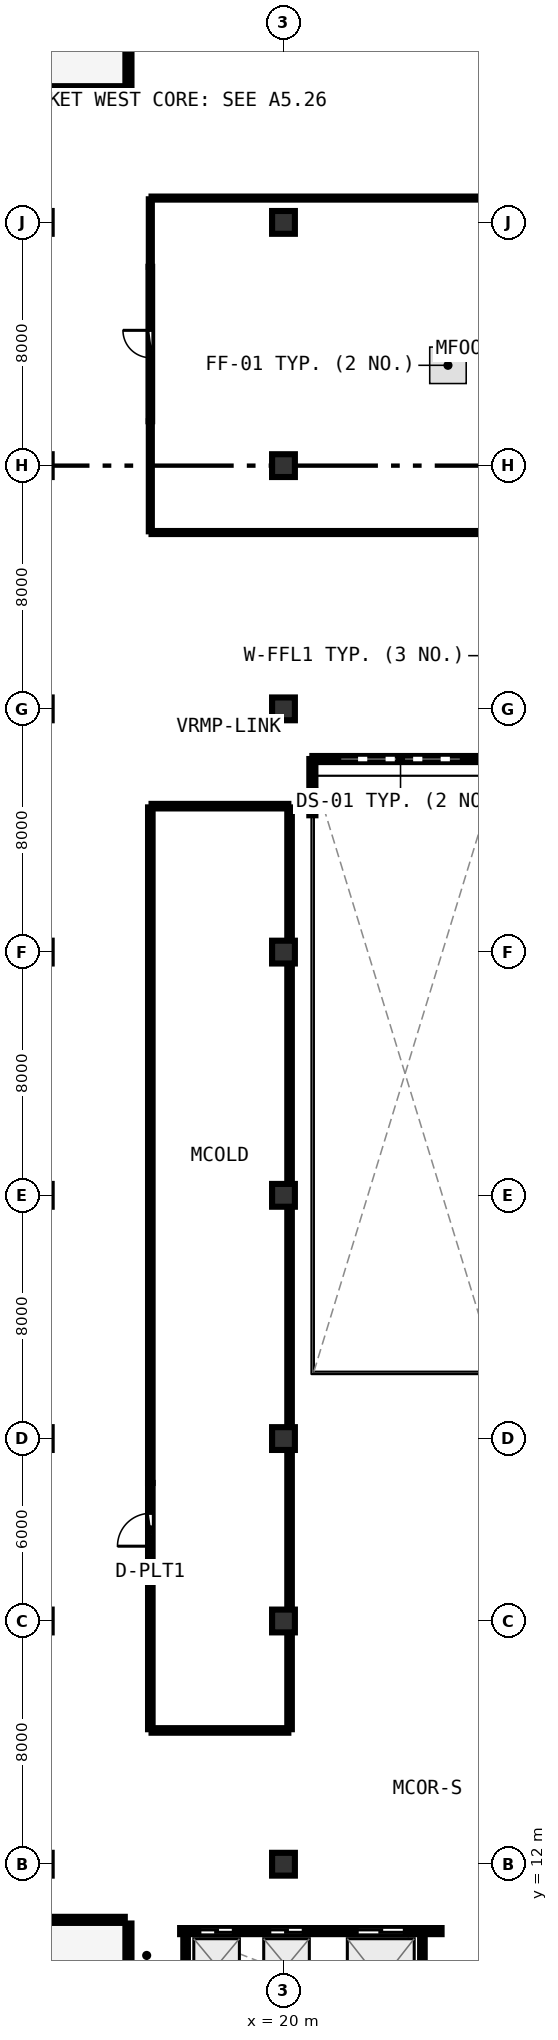
"""IFC4 building model, lengths in metres.
Left out: names, types, materials, properties, quantities, classifications, styles, units other than length and angle.
Written with IfcOpenShell. Run it as: python <this file> out.ifc"""

import sys

from ifc_helpers import new_model, si_unit, direction, frame, frame_2d, origin, origin_2d, place, context, subcontext, project, spatial, rectangle, extrude, element, fill, save


model = new_model("IFC4")
c1 = context("Model", 3, precision=1e-05, world=origin(), true_north=direction((0.0, 1.0)))
c2 = subcontext(c1, "Body", "Model", "MODEL_VIEW")
j1 = project(units=[si_unit("LENGTHUNIT", "METRE"), si_unit("PLANEANGLEUNIT", "RADIAN")], contexts=[c1])
p1 = place(None, origin())
s1 = spatial("IfcSite", under=j1, at=p1, CompositionType="ELEMENT")
p2 = place(p1, origin())
s2 = spatial("IfcBuilding", under=s1, at=p2, CompositionType="ELEMENT")
p3 = place(p2, origin())
s3 = spatial("IfcBuildingStorey", under=s2, at=p3, CompositionType="ELEMENT", Elevation=0.0)
for number, where, z_axis, x_axis in (
    (1, (20.0, 12.0, 0.0), (0.0, 0.0, 1.0), (1.0, 0.0, 0.0)),
    (2, (20.0, 20.0, 0.0), (0.0, 0.0, 1.0), (1.0, 0.0, 0.0)),
    (3, (20.0, 26.0, 0.0), (0.0, 0.0, 1.0), (1.0, 0.0, 0.0)),
    (4, (20.0, 34.0, 0.0), (0.0, 0.0, 1.0), (1.0, 0.0, 0.0)),
    (5, (20.0, 42.0, 0.0), (0.0, 0.0, 1.0), (1.0, 0.0, 0.0)),
    (6, (20.0, 50.0, 0.0), (0.0, 0.0, 1.0), (1.0, 0.0, 0.0)),
    (7, (20.0, 58.0, 0.0), (0.0, 0.0, 1.0), (1.0, 0.0, 0.0)),
    (8, (20.0, 66.0, 0.0), (0.0, 0.0, 1.0), (1.0, 0.0, 0.0)),
):
    element("IfcColumn", number, at=place(p3, frame(where, z_axis=z_axis, x_axis=x_axis)), inside=s3, PredefinedType="COLUMN", context=c2, shape_type="SweptSolid", body=[
        extrude(rectangle(XDim=0.75, YDim=0.75, at=origin_2d()), origin(), (0.0, 0.0, 1.0), 4.5),
    ])
p4 = place(p3, frame((14.9, 6.58, 0.0), z_axis=(0.0, 0.0, 1.0), x_axis=(0.0, 1.0, 0.0)))
e9 = element("IfcWall", 9, at=p4, inside=s3, PredefinedType="SHEAR", context=c2, shape_type="SweptSolid", body=[
    extrude(rectangle(XDim=3.47, YDim=0.2, at=frame_2d((1.735, 0.0))), origin(), (0.0, 0.0, 1.0), 4.24),
])
p5 = place(p3, frame((14.78, 10.17, 0.0), z_axis=(0.0, 0.0, 1.0), x_axis=(-1.0, 0.0, 0.0)))
e10 = element("IfcWall", 10, at=p5, inside=s3, PredefinedType="SHEAR", context=c2, shape_type="SweptSolid", body=[
    extrude(rectangle(XDim=7.76, YDim=0.2, at=frame_2d((3.88, 0.0))), origin(), (0.0, 0.0, 1.0), 4.24),
])
p6 = place(p5, frame((6.51, 0.0, 0.0)))
e11 = element("IfcOpeningElement", 11, at=p6, cuts=e10, PredefinedType="OPENING", context=c2, shape_type="SweptSolid", body=[
    extrude(rectangle(XDim=1.05, YDim=2.1, at=frame_2d((0.525, 1.05))), frame((0.0, 0.11, 0.0), z_axis=(0.0, -1.0, 0.0), x_axis=(1.0, 0.0, 0.0)), (0.0, 0.0, 1.0), 0.22),
])
p7 = place(p3, frame((7.02, 70.38, 0.0), z_axis=(0.0, 0.0, 1.0), x_axis=(1.0, 0.0, 0.0)))
e12 = element("IfcWall", 12, at=p7, inside=s3, PredefinedType="SHEAR", context=c2, shape_type="SweptSolid", body=[
    extrude(rectangle(XDim=7.76, YDim=0.2, at=frame_2d((3.88, 0.0))), origin(), (0.0, 0.0, 1.0), 4.24),
])
p8 = place(p7, frame((0.2, 0.0, 0.0)))
e13 = element("IfcOpeningElement", 13, at=p8, cuts=e12, PredefinedType="OPENING", context=c2, shape_type="SweptSolid", body=[
    extrude(rectangle(XDim=1.05, YDim=2.1, at=frame_2d((0.525, 1.05))), frame((0.0, 0.11, 0.0), z_axis=(0.0, -1.0, 0.0), x_axis=(1.0, 0.0, 0.0)), (0.0, 0.0, 1.0), 0.22),
])
p9 = place(p3, frame((14.9, 70.5, 0.0), z_axis=(0.0, 0.0, 1.0), x_axis=(0.0, 1.0, 0.0)))
e14 = element("IfcWall", 14, at=p9, inside=s3, PredefinedType="SHEAR", context=c2, shape_type="SweptSolid", body=[
    extrude(rectangle(XDim=3.47, YDim=0.2, at=frame_2d((1.735, 0.0))), origin(), (0.0, 0.0, 1.0), 4.24),
])
p10 = place(p3, frame((20.95, 48.35, 0.0), z_axis=(0.0, 0.0, 1.0), x_axis=(1.0, 0.0, 0.0)))
e15 = element("IfcWall", 15, at=p10, inside=s3, PredefinedType="SOLIDWALL", context=c2, shape_type="SweptSolid", body=[
    extrude(rectangle(XDim=6.1, YDim=0.2, at=frame_2d((3.05, 0.0))), origin(), (0.0, 0.0, 1.0), 4.19),
])
p11 = place(p10, frame((0.9, 0.0, 0.0)))
e16 = element("IfcOpeningElement", 16, at=p11, cuts=e15, PredefinedType="OPENING", context=c2, shape_type="SweptSolid", body=[
    extrude(rectangle(XDim=4.0, YDim=3.2, at=frame_2d((2.0, 1.6))), frame((0.0, 0.11, 0.0), z_axis=(0.0, -1.0, 0.0), x_axis=(1.0, 0.0, 0.0)), (0.0, 0.0, 1.0), 0.22),
])
p12 = place(p3, frame((20.95, 48.35, 0.0), z_axis=(0.0, 0.0, 1.0), x_axis=(0.0, -1.0, 0.0)))
e17 = element("IfcWall", 17, at=p12, inside=s3, PredefinedType="SOLIDWALL", context=c2, shape_type="SweptSolid", body=[
    extrude(rectangle(XDim=1.85, YDim=0.2, at=frame_2d((0.925, 0.0))), origin(), (0.0, 0.0, 1.0), 4.19),
])
p13 = place(p3, frame((16.6, 9.8, 0.0), z_axis=(0.0, 0.0, 1.0), x_axis=(1.0, 0.0, 0.0)))
e18 = element("IfcWall", 18, at=p13, inside=s3, PredefinedType="SOLIDWALL", context=c2, shape_type="SweptSolid", body=[
    extrude(rectangle(XDim=8.6, YDim=0.2, at=frame_2d((4.3, 0.0))), origin(), (0.0, 0.0, 1.0), 3.425),
])
p14 = place(p13, frame((0.65, 0.0, 0.0)))
e19 = element("IfcOpeningElement", 19, at=p14, cuts=e18, PredefinedType="OPENING", context=c2, shape_type="SweptSolid", body=[
    extrude(rectangle(XDim=1.1, YDim=2.1, at=frame_2d((0.55, 1.05))), frame((0.0, 0.11, 0.0), z_axis=(0.0, -1.0, 0.0), x_axis=(1.0, 0.0, 0.0)), (0.0, 0.0, 1.0), 0.22),
])
p15 = place(p13, frame((2.95, 0.0, 0.0)))
e20 = element("IfcOpeningElement", 20, at=p15, cuts=e18, PredefinedType="OPENING", context=c2, shape_type="SweptSolid", body=[
    extrude(rectangle(XDim=1.1, YDim=2.1, at=frame_2d((0.55, 1.05))), frame((0.0, 0.11, 0.0), z_axis=(0.0, -1.0, 0.0), x_axis=(1.0, 0.0, 0.0)), (0.0, 0.0, 1.0), 0.22),
])
p16 = place(p13, frame((5.825, 0.0, 0.0)))
e21 = element("IfcOpeningElement", 21, at=p16, cuts=e18, PredefinedType="OPENING", context=c2, shape_type="SweptSolid", body=[
    extrude(rectangle(XDim=1.55, YDim=2.2, at=frame_2d((0.775, 1.1))), frame((0.0, 0.11, 0.0), z_axis=(0.0, -1.0, 0.0), x_axis=(1.0, 0.0, 0.0)), (0.0, 0.0, 1.0), 0.22),
])
for number, where, z_axis, x_axis in (
    (22, (16.78, 6.76, 0.0), (0.0, 0.0, 1.0), (0.0, 1.0, 0.0)),
    (23, (24.57, 6.76, 0.0), (0.0, 0.0, 1.0), (0.0, 1.0, 0.0)),
):
    element("IfcWall", number, at=place(p3, frame(where, z_axis=z_axis, x_axis=x_axis)), inside=s3, PredefinedType="PARTITIONING", context=c2, shape_type="SweptSolid", body=[
        extrude(rectangle(XDim=2.91, YDim=0.15, at=frame_2d((1.455, 0.0))), origin(), (0.0, 0.0, 1.0), 4.23),
    ])
p17 = place(p3, frame((15.62, 21.46, 0.0), z_axis=(0.0, 0.0, 1.0), x_axis=(0.0, 1.0, 0.0)))
e24 = element("IfcWall", 24, at=p17, inside=s3, PredefinedType="PARTITIONING", context=c2, shape_type="SweptSolid", body=[
    extrude(rectangle(XDim=3.08, YDim=0.15, at=frame_2d((1.54, 0.0))), origin(), (0.0, 0.0, 1.0), 4.19),
])
p18 = place(p17, frame((1.0, 0.0, 0.0)))
e25 = element("IfcOpeningElement", 25, at=p18, cuts=e24, PredefinedType="OPENING", context=c2, shape_type="SweptSolid", body=[
    extrude(rectangle(XDim=1.08, YDim=2.1, at=frame_2d((0.54, 1.05))), frame((0.0, 0.085, 0.0), z_axis=(0.0, -1.0, 0.0), x_axis=(1.0, 0.0, 0.0)), (0.0, 0.0, 1.0), 0.17),
])
p19 = place(p3, frame((15.62, 59.46, 0.0), z_axis=(0.0, 0.0, 1.0), x_axis=(0.0, 1.0, 0.0)))
e26 = element("IfcWall", 26, at=p19, inside=s3, PredefinedType="PARTITIONING", context=c2, shape_type="SweptSolid", body=[
    extrude(rectangle(XDim=5.08, YDim=0.12, at=frame_2d((2.54, 0.0))), origin(), (0.0, 0.0, 1.0), 4.19),
])
p20 = place(p19, frame((2.09, 0.0, 0.0)))
e27 = element("IfcOpeningElement", 27, at=p20, cuts=e26, PredefinedType="OPENING", context=c2, shape_type="SweptSolid", body=[
    extrude(rectangle(XDim=0.9, YDim=2.08, at=frame_2d((0.45, 1.04))), frame((0.0, 0.07, 0.0), z_axis=(0.0, -1.0, 0.0), x_axis=(1.0, 0.0, 0.0)), (0.0, 0.0, 1.0), 0.14),
])
p21 = place(p3, frame((15.66, 16.4, 0.0), z_axis=(0.0, 0.0, 1.0), x_axis=(1.0, 0.0, 0.0)))
e28 = element("IfcWall", 28, at=p21, inside=s3, PredefinedType="PARTITIONING", context=c2, shape_type="SweptSolid", body=[
    extrude(rectangle(XDim=4.5, YDim=0.15, at=frame_2d((2.25, 0.0))), origin(), (0.0, 0.0, 1.0), 3.425),
])
p22 = place(p3, frame((20.2, 16.44, 0.0), z_axis=(0.0, 0.0, 1.0), x_axis=(0.0, 1.0, 0.0)))
e29 = element("IfcWall", 29, at=p22, inside=s3, PredefinedType="PARTITIONING", context=c2, shape_type="SweptSolid", body=[
    extrude(rectangle(XDim=3.214, YDim=0.15, at=frame_2d((1.607, 0.0))), origin(), (0.0, 0.0, 1.0), 3.425),
])
p23 = place(p3, frame((20.2, 20.346, 0.0), z_axis=(0.0, 0.0, 1.0), x_axis=(0.0, 1.0, 0.0)))
e30 = element("IfcWall", 30, at=p23, inside=s3, PredefinedType="PARTITIONING", context=c2, shape_type="SweptSolid", body=[
    extrude(rectangle(XDim=5.307, YDim=0.15, at=frame_2d((2.654, 0.0))), origin(), (0.0, 0.0, 1.0), 3.425),
])
for number, where, z_axis, x_axis in (
    (31, (20.2, 26.346, 0.0), (0.0, 0.0, 1.0), (0.0, 1.0, 0.0)),
    (32, (20.2, 34.346, 0.0), (0.0, 0.0, 1.0), (0.0, 1.0, 0.0)),
):
    element("IfcWall", number, at=place(p3, frame(where, z_axis=z_axis, x_axis=x_axis)), inside=s3, PredefinedType="PARTITIONING", context=c2, shape_type="SweptSolid", body=[
        extrude(rectangle(XDim=7.307, YDim=0.15, at=frame_2d((3.654, 0.0))), origin(), (0.0, 0.0, 1.0), 3.425),
    ])
p24 = place(p3, frame((20.2, 42.346, 0.0), z_axis=(0.0, 0.0, 1.0), x_axis=(0.0, 1.0, 0.0)))
e33 = element("IfcWall", 33, at=p24, inside=s3, PredefinedType="PARTITIONING", context=c2, shape_type="SweptSolid", body=[
    extrude(rectangle(XDim=4.414, YDim=0.15, at=frame_2d((2.207, 0.0))), origin(), (0.0, 0.0, 1.0), 3.425),
])
p25 = place(p3, frame((20.16, 46.8, 0.0), z_axis=(0.0, 0.0, 1.0), x_axis=(-1.0, 0.0, 0.0)))
e34 = element("IfcWall", 34, at=p25, inside=s3, PredefinedType="PARTITIONING", context=c2, shape_type="SweptSolid", body=[
    extrude(rectangle(XDim=4.5, YDim=0.15, at=frame_2d((2.25, 0.0))), origin(), (0.0, 0.0, 1.0), 3.425),
])
p26 = place(p3, frame((15.62, 46.76, 0.0), z_axis=(0.0, 0.0, 1.0), x_axis=(0.0, -1.0, 0.0)))
e35 = element("IfcWall", 35, at=p26, inside=s3, PredefinedType="PARTITIONING", context=c2, shape_type="SweptSolid", body=[
    extrude(rectangle(XDim=22.22, YDim=0.15, at=frame_2d((11.11, 0.0))), origin(), (0.0, 0.0, 1.0), 3.425),
])
p27 = place(p3, frame((15.62, 21.46, 0.0), z_axis=(0.0, 0.0, 1.0), x_axis=(0.0, -1.0, 0.0)))
e36 = element("IfcWall", 36, at=p27, inside=s3, PredefinedType="PARTITIONING", context=c2, shape_type="SweptSolid", body=[
    extrude(rectangle(XDim=5.02, YDim=0.15, at=frame_2d((2.51, 0.0))), origin(), (0.0, 0.0, 1.0), 3.425),
])
for number, where, z_axis, x_axis in (
    (37, (15.66, 55.8, 0.0), (0.0, 0.0, 1.0), (1.0, 0.0, 0.0)),
    (38, (35.16, 66.8, 0.0), (0.0, 0.0, 1.0), (-1.0, 0.0, 0.0)),
):
    element("IfcWall", number, at=place(p3, frame(where, z_axis=z_axis, x_axis=x_axis)), inside=s3, PredefinedType="PARTITIONING", context=c2, shape_type="SweptSolid", body=[
        extrude(rectangle(XDim=19.5, YDim=0.1, at=frame_2d((9.75, 0.0))), origin(), (0.0, 0.0, 1.0), 3.425),
    ])
p28 = place(p3, frame((15.62, 66.76, 0.0), z_axis=(0.0, 0.0, 1.0), x_axis=(0.0, -1.0, 0.0)))
e39 = element("IfcWall", 39, at=p28, inside=s3, PredefinedType="PARTITIONING", context=c2, shape_type="SweptSolid", body=[
    extrude(rectangle(XDim=2.22, YDim=0.1, at=frame_2d((1.11, 0.0))), origin(), (0.0, 0.0, 1.0), 3.425),
])
p29 = place(p3, frame((15.62, 59.46, 0.0), z_axis=(0.0, 0.0, 1.0), x_axis=(0.0, -1.0, 0.0)))
e40 = element("IfcWall", 40, at=p29, inside=s3, PredefinedType="PARTITIONING", context=c2, shape_type="SweptSolid", body=[
    extrude(rectangle(XDim=3.62, YDim=0.1, at=frame_2d((1.81, 0.0))), origin(), (0.0, 0.0, 1.0), 3.425),
])
p30 = place(p11, frame((4.0, 0.0, 0.0), z_axis=(0.0, 0.0, 1.0), x_axis=(-1.0, 0.0, 0.0)))
e41 = element("IfcDoor", 41, at=p30, inside=s3, OperationType="ROLLINGUP", PredefinedType="GATE", context=c2, shape_type="SweptSolid", body=[
    extrude(rectangle(XDim=4.0, YDim=3.2, at=frame_2d((2.0, 1.6))), frame((0.0, 0.025, 0.0), z_axis=(0.0, -1.0, 0.0), x_axis=(1.0, 0.0, 0.0)), (0.0, 0.0, 1.0), 0.05),
])
fill(e16, e41)
p31 = place(p14, origin())
e42 = element("IfcDoor", 42, at=p31, inside=s3, OperationType="DOUBLE_DOOR_SLIDING", PredefinedType="DOOR", context=c2, shape_type="SweptSolid", body=[
    extrude(rectangle(XDim=1.1, YDim=2.1, at=frame_2d((0.55, 1.05))), frame((0.0, 0.025, 0.0), z_axis=(0.0, -1.0, 0.0), x_axis=(1.0, 0.0, 0.0)), (0.0, 0.0, 1.0), 0.05),
])
fill(e19, e42)
p32 = place(p15, origin())
e43 = element("IfcDoor", 43, at=p32, inside=s3, OperationType="DOUBLE_DOOR_SLIDING", PredefinedType="DOOR", context=c2, shape_type="SweptSolid", body=[
    extrude(rectangle(XDim=1.1, YDim=2.1, at=frame_2d((0.55, 1.05))), frame((0.0, 0.025, 0.0), z_axis=(0.0, -1.0, 0.0), x_axis=(1.0, 0.0, 0.0)), (0.0, 0.0, 1.0), 0.05),
])
fill(e20, e43)
p33 = place(p16, origin())
e44 = element("IfcDoor", 44, at=p33, inside=s3, OperationType="DOUBLE_DOOR_SLIDING", PredefinedType="DOOR", context=c2, shape_type="SweptSolid", body=[
    extrude(rectangle(XDim=1.55, YDim=2.2, at=frame_2d((0.775, 1.1))), frame((0.0, 0.025, 0.0), z_axis=(0.0, -1.0, 0.0), x_axis=(1.0, 0.0, 0.0)), (0.0, 0.0, 1.0), 0.05),
])
fill(e21, e44)
p34 = place(p18, origin())
e45 = element("IfcDoor", 45, at=p34, inside=s3, OperationType="SINGLE_SWING_LEFT", PredefinedType="DOOR", context=c2, shape_type="SweptSolid", body=[
    extrude(rectangle(XDim=1.08, YDim=2.1, at=frame_2d((0.54, 1.05))), frame((0.0, 0.025, 0.0), z_axis=(0.0, -1.0, 0.0), x_axis=(1.0, 0.0, 0.0)), (0.0, 0.0, 1.0), 0.05),
])
fill(e25, e45)
p35 = place(p20, origin())
e46 = element("IfcDoor", 46, at=p35, inside=s3, OperationType="SINGLE_SWING_RIGHT", PredefinedType="DOOR", context=c2, shape_type="SweptSolid", body=[
    extrude(rectangle(XDim=0.9, YDim=2.08, at=frame_2d((0.45, 1.04))), frame((0.0, 0.025, 0.0), z_axis=(0.0, -1.0, 0.0), x_axis=(1.0, 0.0, 0.0)), (0.0, 0.0, 1.0), 0.05),
])
fill(e27, e46)
save(model, sys.argv[1])
